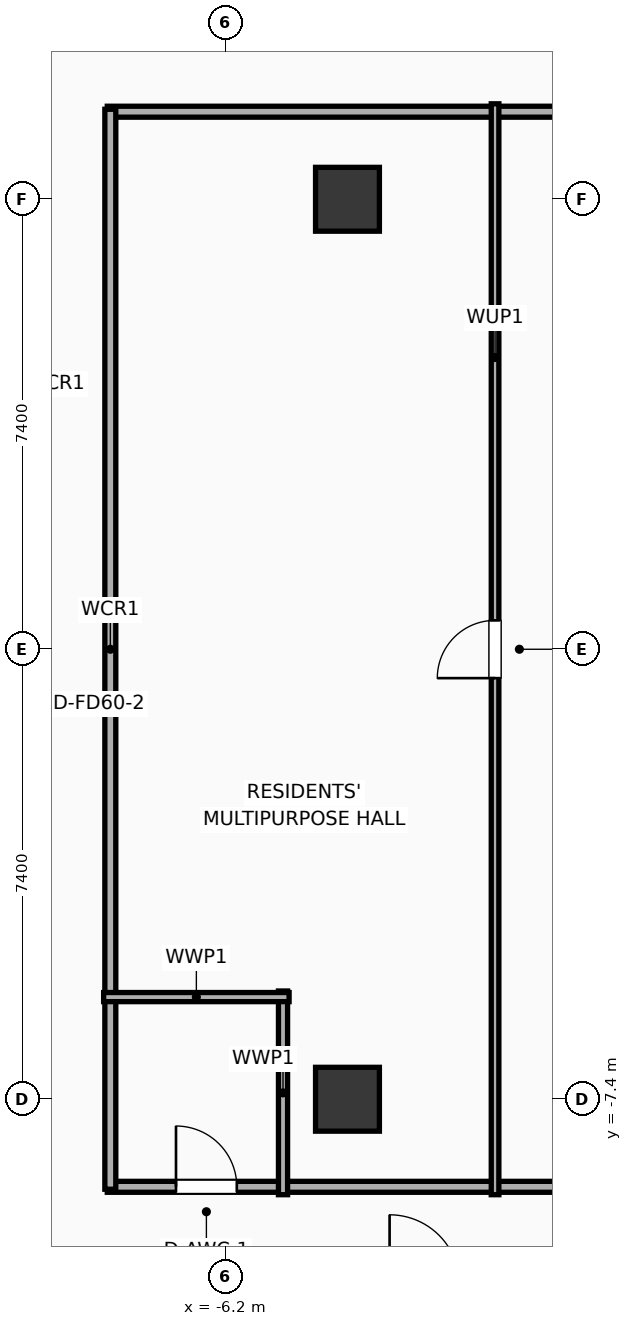
"""IFC4 building model, lengths in metres.
Left out: names, types, materials, properties, quantities, classifications, styles, units other than length and angle.
Written with IfcOpenShell. Run it as: python <this file> out.ifc"""

import sys

from ifc_helpers import new_model, si_unit, direction, frame, frame_2d, origin, origin_2d, place, context, subcontext, project, spatial, rectangle, extrude, element, fill, save


model = new_model("IFC4")
c1 = context("Model", 3, precision=1e-05, world=origin(), true_north=direction((0.0, 1.0)))
c2 = subcontext(c1, "Body", "Model", "MODEL_VIEW")
j1 = project(units=[si_unit("LENGTHUNIT", "METRE"), si_unit("PLANEANGLEUNIT", "RADIAN")], contexts=[c1])
p1 = place(None, origin())
s1 = spatial("IfcSite", under=j1, at=p1, CompositionType="ELEMENT")
p2 = place(p1, origin())
s2 = spatial("IfcBuilding", under=s1, at=p2, CompositionType="ELEMENT")
p3 = place(p2, frame((0.0, 0.0, 26.0)))
s3 = spatial("IfcBuildingStorey", under=s2, at=p3, CompositionType="ELEMENT", Elevation=26.0)
for number, where, z_axis, x_axis in (
    (1, (-4.2, -7.4, 0.0), (0.0, 0.0, 1.0), (1.0, 0.0, 0.0)),
    (2, (-4.2, 7.4, 0.0), (0.0, 0.0, 1.0), (1.0, 0.0, 0.0)),
):
    element("IfcColumn", number, at=place(p3, frame(where, z_axis=z_axis, x_axis=x_axis)), inside=s3, PredefinedType="COLUMN", context=c2, shape_type="SweptSolid", body=[
        extrude(rectangle(XDim=1.05, YDim=1.05, at=origin_2d()), origin(), (0.0, 0.0, 1.0), 3.9),
    ])
p4 = place(p3, frame((-8.15, 8.84, 0.0), z_axis=(0.0, 0.0, 1.0), x_axis=(1.0, 0.0, 0.0)))
e3 = element("IfcWall", 3, at=p4, inside=s3, PredefinedType="PARTITIONING", context=c2, shape_type="SweptSolid", body=[
    extrude(rectangle(XDim=16.3, YDim=0.18, at=frame_2d((8.15, 0.0))), origin(), (0.0, 0.0, 1.0), 3.65),
])
p5 = place(p4, frame((8.49, 0.0, 0.0)))
e4 = element("IfcOpeningElement", 4, at=p5, cuts=e3, PredefinedType="OPENING", context=c2, shape_type="SweptSolid", body=[
    extrude(rectangle(XDim=0.95, YDim=2.05, at=frame_2d((0.475, 1.025))), frame((0.0, 0.1, 0.0), z_axis=(0.0, -1.0, 0.0), x_axis=(1.0, 0.0, 0.0)), (0.0, 0.0, 1.0), 0.2),
])
p6 = place(p3, frame((-8.15, -8.84, 0.0), z_axis=(0.0, 0.0, 1.0), x_axis=(1.0, 0.0, 0.0)))
e5 = element("IfcWall", 5, at=p6, inside=s3, PredefinedType="PARTITIONING", context=c2, shape_type="SweptSolid", body=[
    extrude(rectangle(XDim=16.3, YDim=0.18, at=frame_2d((8.15, 0.0))), origin(), (0.0, 0.0, 1.0), 3.65),
])
p7 = place(p6, frame((1.13, 0.0, 0.0)))
e6 = element("IfcOpeningElement", 6, at=p7, cuts=e5, PredefinedType="OPENING", context=c2, shape_type="SweptSolid", body=[
    extrude(rectangle(XDim=1.0, YDim=2.05, at=frame_2d((0.5, 1.025))), frame((0.0, 0.1, 0.0), z_axis=(0.0, -1.0, 0.0), x_axis=(1.0, 0.0, 0.0)), (0.0, 0.0, 1.0), 0.2),
])
p8 = place(p6, frame((10.12, 0.0, 0.0)))
e7 = element("IfcOpeningElement", 7, at=p8, cuts=e5, PredefinedType="OPENING", context=c2, shape_type="SweptSolid", body=[
    extrude(rectangle(XDim=0.95, YDim=2.05, at=frame_2d((0.475, 1.025))), frame((0.0, 0.1, 0.0), z_axis=(0.0, -1.0, 0.0), x_axis=(1.0, 0.0, 0.0)), (0.0, 0.0, 1.0), 0.2),
])
p9 = place(p3, frame((-8.1, -8.88, 0.0), z_axis=(0.0, 0.0, 1.0), x_axis=(0.0, 1.0, 0.0)))
e8 = element("IfcWall", 8, at=p9, inside=s3, PredefinedType="PARTITIONING", context=c2, shape_type="SweptSolid", body=[
    extrude(rectangle(XDim=17.76, YDim=0.18, at=frame_2d((8.88, 0.0))), origin(), (0.0, 0.0, 1.0), 3.65),
])
p10 = place(p3, frame((-5.26, -8.97, 0.0), z_axis=(0.0, 0.0, 1.0), x_axis=(0.0, 1.0, 0.0)))
e9 = element("IfcWall", 9, at=p10, inside=s3, PredefinedType="PLUMBINGWALL", context=c2, shape_type="SweptSolid", body=[
    extrude(rectangle(XDim=3.35, YDim=0.15, at=frame_2d((1.675, 0.0))), origin(), (0.0, 0.0, 1.0), 3.65),
])
p11 = place(p3, frame((-8.21, -5.72, 0.0), z_axis=(0.0, 0.0, 1.0), x_axis=(1.0, 0.0, 0.0)))
e10 = element("IfcWall", 10, at=p11, inside=s3, PredefinedType="PLUMBINGWALL", context=c2, shape_type="SweptSolid", body=[
    extrude(rectangle(XDim=3.05, YDim=0.15, at=frame_2d((1.525, 0.0))), origin(), (0.0, 0.0, 1.0), 3.65),
])
p12 = place(p3, frame((-1.773, -8.97, 0.0), z_axis=(0.0, 0.0, 1.0), x_axis=(0.0, 1.0, 0.0)))
e11 = element("IfcWall", 11, at=p12, inside=s3, PredefinedType="PARTITIONING", context=c2, shape_type="SweptSolid", body=[
    extrude(rectangle(XDim=17.94, YDim=0.125, at=frame_2d((8.97, 0.0))), origin(), (0.0, 0.0, 1.0), 3.65),
])
p13 = place(p12, frame((8.495, 0.0, 0.0)))
e12 = element("IfcOpeningElement", 12, at=p13, cuts=e11, PredefinedType="OPENING", context=c2, shape_type="SweptSolid", body=[
    extrude(rectangle(XDim=0.95, YDim=2.05, at=frame_2d((0.475, 1.025))), frame((0.0, 0.073, 0.0), z_axis=(0.0, -1.0, 0.0), x_axis=(1.0, 0.0, 0.0)), (0.0, 0.0, 1.0), 0.145),
])
p14 = place(p7, origin())
e13 = element("IfcDoor", 13, at=p14, inside=s3, OperationType="SINGLE_SWING_LEFT", PredefinedType="DOOR", context=c2, shape_type="SweptSolid", body=[
    extrude(rectangle(XDim=1.0, YDim=2.05, at=frame_2d((0.5, 1.025))), frame((0.0, 0.025, 0.0), z_axis=(0.0, -1.0, 0.0), x_axis=(1.0, 0.0, 0.0)), (0.0, 0.0, 1.0), 0.05),
])
fill(e6, e13)
p15 = place(p13, origin())
e14 = element("IfcDoor", 14, at=p15, inside=s3, OperationType="SINGLE_SWING_LEFT", PredefinedType="DOOR", context=c2, shape_type="SweptSolid", body=[
    extrude(rectangle(XDim=0.95, YDim=2.05, at=frame_2d((0.475, 1.025))), frame((0.0, 0.025, 0.0), z_axis=(0.0, -1.0, 0.0), x_axis=(1.0, 0.0, 0.0)), (0.0, 0.0, 1.0), 0.05),
])
fill(e12, e14)
save(model, sys.argv[1])
